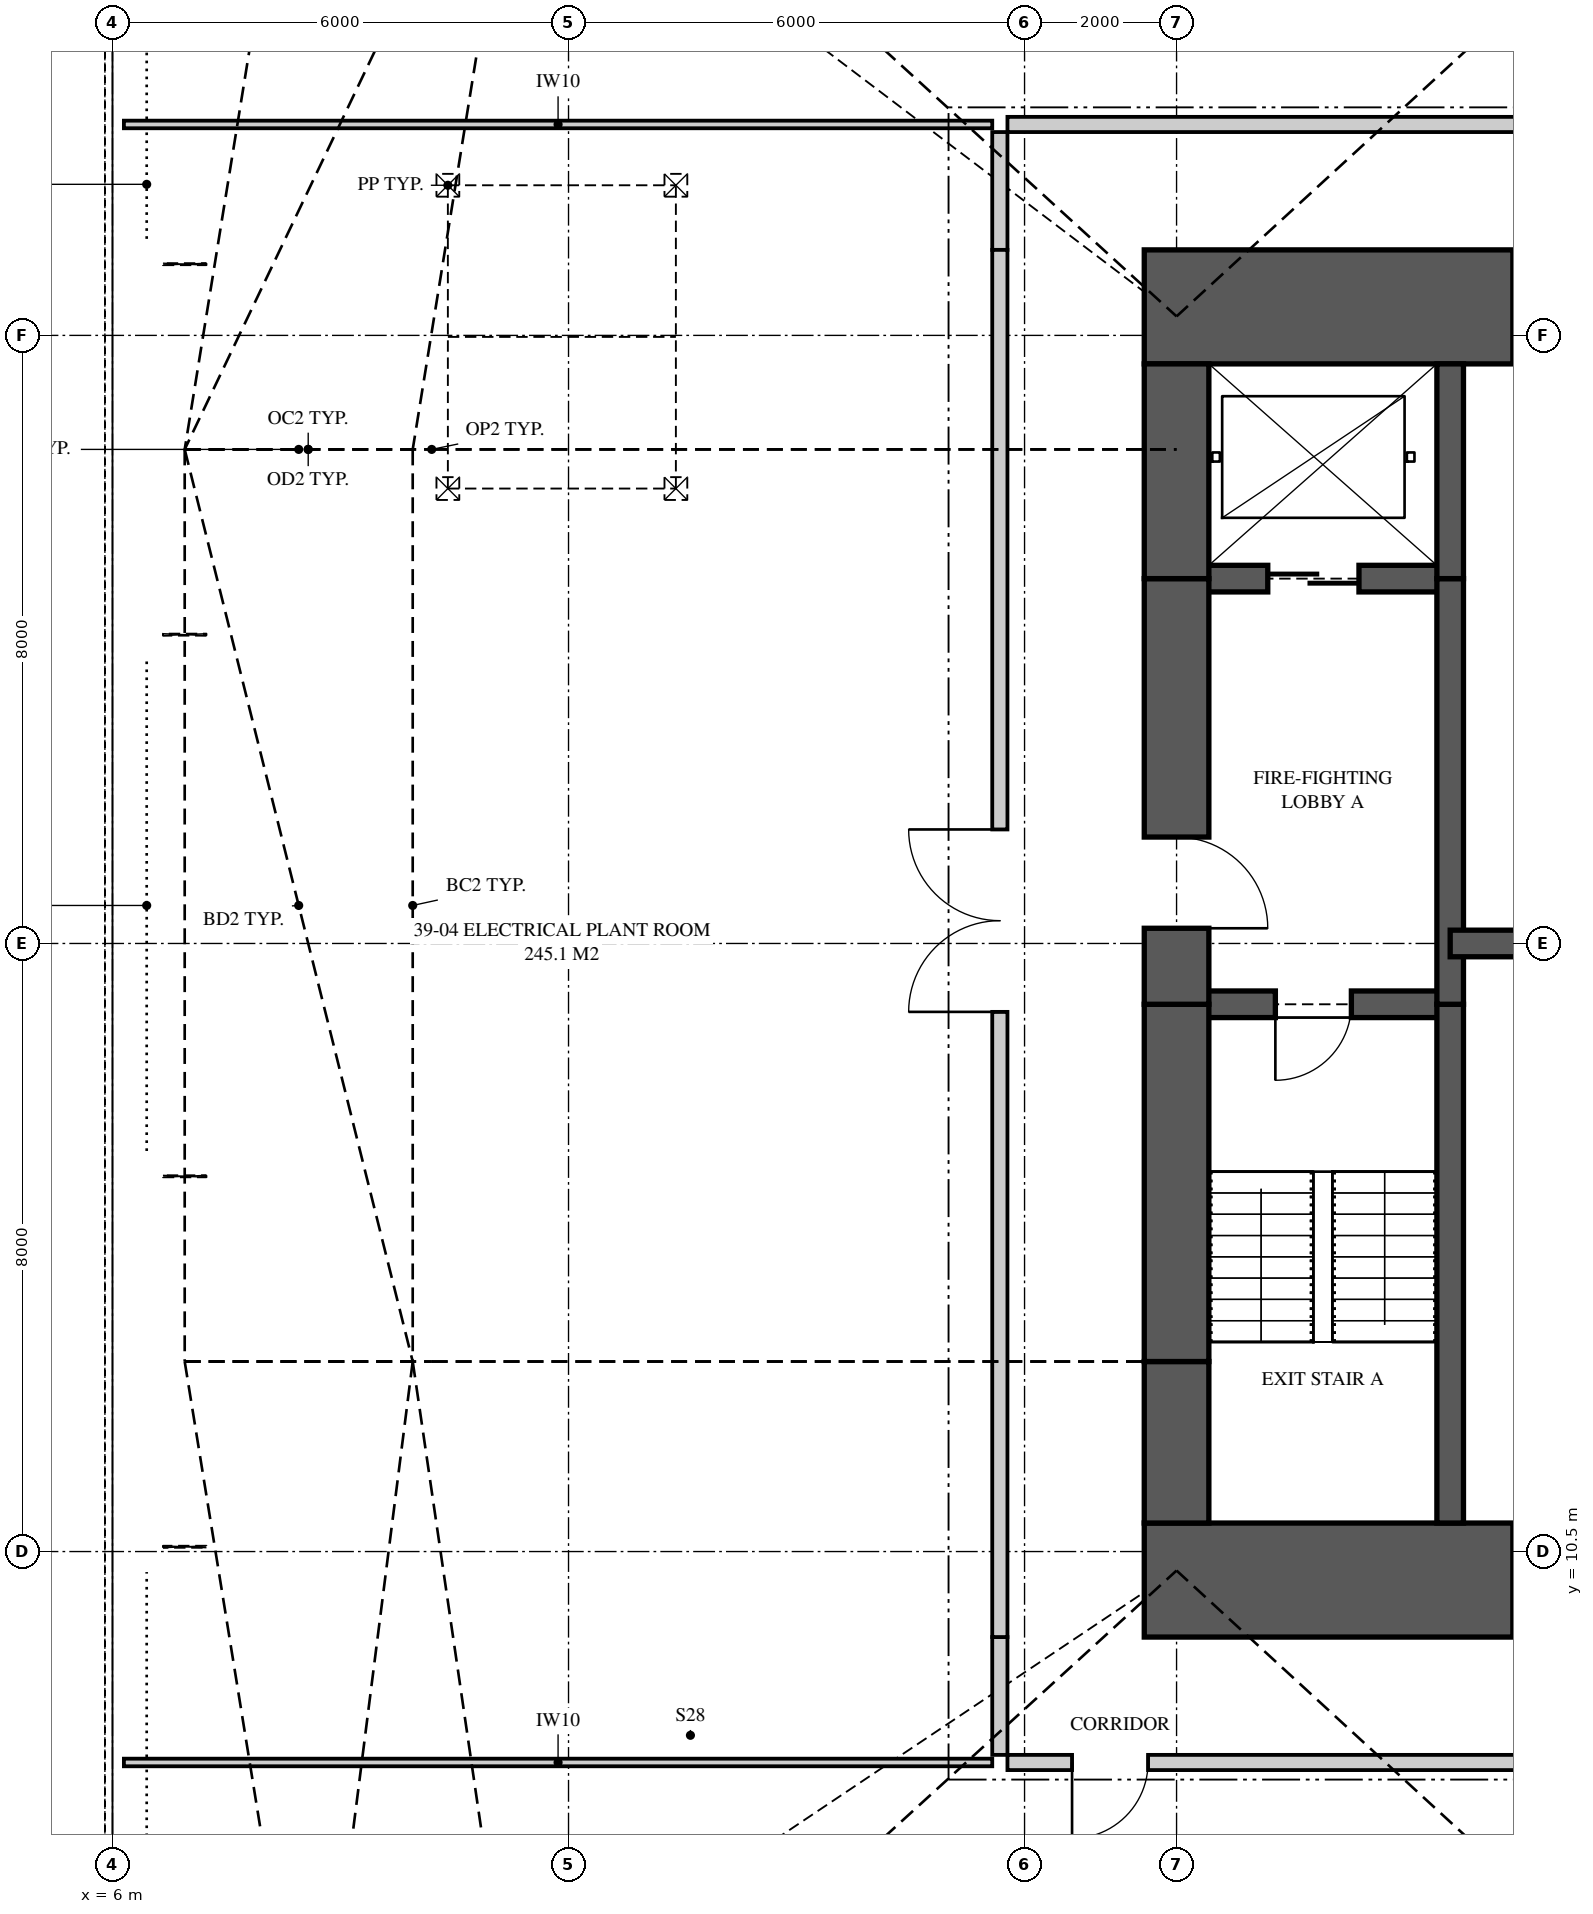
"""IFC4 building model, lengths in metres.
Left out: names, types, materials, properties, quantities, classifications, styles, units other than length and angle.
Written with IfcOpenShell. Run it as: python <this file> out.ifc"""

import sys

from ifc_helpers import new_model, si_unit, direction, frame, frame_2d, origin, place, context, subcontext, project, spatial, polyline, rectangle, outline, extrude, element, fill, save


model = new_model("IFC4")
c1 = context("Model", 3, precision=1e-05, world=origin(), true_north=direction((0.0, 1.0)))
c2 = subcontext(c1, "Body", "Model", "MODEL_VIEW")
j1 = project(units=[si_unit("LENGTHUNIT", "METRE"), si_unit("PLANEANGLEUNIT", "RADIAN")], contexts=[c1])
p1 = place(None, origin())
s1 = spatial("IfcSite", under=j1, at=p1, CompositionType="ELEMENT")
p2 = place(p1, origin())
s2 = spatial("IfcBuilding", under=s1, at=p2, CompositionType="ELEMENT")
p3 = place(p2, frame((0.0, 0.0, 144.35)))
s3 = spatial("IfcBuildingStorey", under=s2, at=p3, CompositionType="ELEMENT", Elevation=144.35)
p4 = place(p3, frame((19.575, 10.125, 0.0), z_axis=(0.0, 0.0, 1.0), x_axis=(1.0, 0.0, 0.0)))
e1 = element("IfcWall", 1, at=p4, inside=s3, PredefinedType="SHEAR", context=c2, shape_type="SweptSolid", body=[
    extrude(rectangle(XDim=6.425, YDim=1.5, at=frame_2d((3.212, 0.0))), origin(), (0.0, 0.0, 1.0), 5.0),
])
p5 = place(p4, frame((4.85, 0.0, 0.0)))
e2 = element("IfcOpeningElement", 2, at=p5, cuts=e1, PredefinedType="OPENING", context=c2, shape_type="SweptSolid", body=[
    extrude(rectangle(XDim=0.75, YDim=2.1, at=frame_2d((0.375, 1.05))), frame((0.0, 0.76, 0.0), z_axis=(0.0, -1.0, 0.0), x_axis=(1.0, 0.0, 0.0)), (0.0, 0.0, 1.0), 1.52),
])
p6 = place(p3, frame((26.0, 26.875, 0.0), z_axis=(0.0, 0.0, 1.0), x_axis=(-1.0, 0.0, 0.0)))
e3 = element("IfcWall", 3, at=p6, inside=s3, PredefinedType="SHEAR", context=c2, shape_type="SweptSolid", body=[
    extrude(rectangle(XDim=6.425, YDim=1.5, at=frame_2d((3.212, 0.0))), origin(), (0.0, 0.0, 1.0), 5.0),
])
p7 = place(p6, frame((0.825, 0.0, 0.0)))
e4 = element("IfcOpeningElement", 4, at=p7, cuts=e3, PredefinedType="OPENING", context=c2, shape_type="SweptSolid", body=[
    extrude(rectangle(XDim=0.75, YDim=2.1, at=frame_2d((0.375, 1.05))), frame((0.0, 0.76, 0.0), z_axis=(0.0, -1.0, 0.0), x_axis=(1.0, 0.0, 0.0)), (0.0, 0.0, 1.0), 1.52),
])
p8 = place(p3, frame((20.0, 26.125, 0.0), z_axis=(0.0, 0.0, 1.0), x_axis=(0.0, -1.0, 0.0)))
e5 = element("IfcWall", 5, at=p8, inside=s3, PredefinedType="SHEAR", context=c2, shape_type="SweptSolid", body=[
    extrude(rectangle(XDim=2.825, YDim=0.85, at=frame_2d((1.413, 0.0))), origin(), (0.0, 0.0, 1.0), 5.0),
])
p9 = place(p3, frame((20.0, 23.3, 0.0), z_axis=(0.0, 0.0, 1.0), x_axis=(0.0, -1.0, 0.0)))
e6 = element("IfcWall", 6, at=p9, inside=s3, PredefinedType="SHEAR", context=c2, shape_type="SweptSolid", body=[
    extrude(rectangle(XDim=5.6, YDim=0.85, at=frame_2d((2.8, 0.0))), origin(), (0.0, 0.0, 1.0), 5.0),
])
p10 = place(p9, frame((3.4, 0.0, 0.0)))
e7 = element("IfcOpeningElement", 7, at=p10, cuts=e6, PredefinedType="OPENING", context=c2, shape_type="SweptSolid", body=[
    extrude(rectangle(XDim=1.2, YDim=2.2, at=frame_2d((0.6, 1.1))), frame((0.0, 0.435, 0.0), z_axis=(0.0, -1.0, 0.0), x_axis=(1.0, 0.0, 0.0)), (0.0, 0.0, 1.0), 0.87),
])
p11 = place(p3, frame((20.0, 17.7, 0.0), z_axis=(0.0, 0.0, 1.0), x_axis=(0.0, -1.0, 0.0)))
e8 = element("IfcWall", 8, at=p11, inside=s3, PredefinedType="SHEAR", context=c2, shape_type="SweptSolid", body=[
    extrude(rectangle(XDim=4.7, YDim=0.85, at=frame_2d((2.35, 0.0))), origin(), (0.0, 0.0, 1.0), 5.0),
])
p12 = place(p3, frame((20.0, 13.0, 0.0), z_axis=(0.0, 0.0, 1.0), x_axis=(0.0, -1.0, 0.0)))
e9 = element("IfcWall", 9, at=p12, inside=s3, PredefinedType="SHEAR", context=c2, shape_type="SweptSolid", body=[
    extrude(rectangle(XDim=2.125, YDim=0.85, at=frame_2d((1.062, 0.0))), origin(), (0.0, 0.0, 1.0), 5.0),
])
p13 = place(p3, frame((23.6, 10.875, 0.0), z_axis=(0.0, 0.0, 1.0), x_axis=(0.0, 1.0, 0.0)))
e10 = element("IfcWall", 10, at=p13, inside=s3, PredefinedType="SHEAR", context=c2, shape_type="SweptSolid", body=[
    extrude(rectangle(XDim=6.825, YDim=0.35, at=frame_2d((3.413, 0.0))), origin(), (0.0, 0.0, 1.0), 5.0),
])
p14 = place(p3, frame((23.6, 17.7, 0.0), z_axis=(0.0, 0.0, 1.0), x_axis=(0.0, 1.0, 0.0)))
e11 = element("IfcWall", 11, at=p14, inside=s3, PredefinedType="SHEAR", context=c2, shape_type="SweptSolid", body=[
    extrude(rectangle(XDim=5.6, YDim=0.35, at=frame_2d((2.8, 0.0))), origin(), (0.0, 0.0, 1.0), 5.0),
])
p15 = place(p3, frame((23.6, 23.3, 0.0), z_axis=(0.0, 0.0, 1.0), x_axis=(0.0, 1.0, 0.0)))
e12 = element("IfcWall", 12, at=p15, inside=s3, PredefinedType="SHEAR", context=c2, shape_type="SweptSolid", body=[
    extrude(rectangle(XDim=2.825, YDim=0.35, at=frame_2d((1.413, 0.0))), origin(), (0.0, 0.0, 1.0), 5.0),
])
p16 = place(p3, frame((20.0, 17.7, 0.0), z_axis=(0.0, 0.0, 1.0), x_axis=(1.0, 0.0, 0.0)))
e13 = element("IfcWall", 13, at=p16, inside=s3, PredefinedType="SHEAR", context=c2, shape_type="SweptSolid", body=[
    extrude(rectangle(XDim=3.6, YDim=0.35, at=frame_2d((1.8, 0.0))), origin(), (0.0, 0.0, 1.0), 5.0),
])
p17 = place(p16, frame((1.3, 0.0, 0.0)))
e14 = element("IfcOpeningElement", 14, at=p17, cuts=e13, PredefinedType="OPENING", context=c2, shape_type="SweptSolid", body=[
    extrude(rectangle(XDim=1.0, YDim=2.1, at=frame_2d((0.5, 1.05))), frame((0.0, 0.185, 0.0), z_axis=(0.0, -1.0, 0.0), x_axis=(1.0, 0.0, 0.0)), (0.0, 0.0, 1.0), 0.37),
])
p18 = place(p3, frame((20.0, 23.3, 0.0), z_axis=(0.0, 0.0, 1.0), x_axis=(1.0, 0.0, 0.0)))
e15 = element("IfcWall", 15, at=p18, inside=s3, PredefinedType="SHEAR", context=c2, shape_type="SweptSolid", body=[
    extrude(rectangle(XDim=3.6, YDim=0.35, at=frame_2d((1.8, 0.0))), origin(), (0.0, 0.0, 1.0), 5.0),
])
p19 = place(p18, frame((1.2, 0.0, 0.0)))
e16 = element("IfcOpeningElement", 16, at=p19, cuts=e15, PredefinedType="OPENING", context=c2, shape_type="SweptSolid", body=[
    extrude(rectangle(XDim=1.2, YDim=2.1, at=frame_2d((0.6, 1.05))), frame((0.0, 0.185, 0.0), z_axis=(0.0, -1.0, 0.0), x_axis=(1.0, 0.0, 0.0)), (0.0, 0.0, 1.0), 0.37),
])
p20 = place(p3, frame((23.6, 18.5, 0.0), z_axis=(0.0, 0.0, 1.0), x_axis=(1.0, 0.0, 0.0)))
e17 = element("IfcWall", 17, at=p20, inside=s3, PredefinedType="SHEAR", context=c2, shape_type="SweptSolid", body=[
    extrude(rectangle(XDim=2.4, YDim=0.35, at=frame_2d((1.2, 0.0))), origin(), (0.0, 0.0, 1.0), 5.0),
])
p21 = place(p3, frame((17.775, 7.725, 0.0), z_axis=(0.0, 0.0, 1.0), x_axis=(1.0, 0.0, 0.0)))
e18 = element("IfcWall", 18, at=p21, inside=s3, PredefinedType="PARTITIONING", context=c2, shape_type="SweptSolid", body=[
    extrude(outline(polyline([(28.25, 0.0), (28.25, 4.72), (27.983, 4.72), (27.983, 4.141), (27.295, 4.141), (27.295, 4.72), (25.672, 4.72), (25.672, 4.141), (24.748, 4.141), (24.748, 4.72), (20.146, 4.72), (20.146, 4.141), (19.233, 4.141), (19.233, 4.72), (16.72, 4.72), (16.72, 4.141), (15.864, 4.141), (15.864, 4.72), (12.635, 4.72), (12.635, 4.208), (12.065, 4.208), (12.065, 4.72), (8.798, 4.72), (8.798, 4.141), (7.945, 4.141), (7.945, 4.72), (5.432, 4.72), (5.432, 4.141), (4.516, 4.141), (4.516, 4.72), (0.0, 4.72), (0.0, 0.0), (26.463, 0.0), (26.463, 2.2), (27.621, 2.2), (27.621, 0.0), (28.25, 0.0)]), holes=[polyline([(11.405, 3.239), (11.459, 3.353), (12.006, 3.423), (12.006, 2.917), (11.951, 2.803), (11.405, 2.732), (11.405, 3.239)])]), frame((0.0, 0.1, 0.0), z_axis=(0.0, -1.0, 0.0), x_axis=(1.0, 0.0, 0.0)), (0.0, 0.0, 1.0), 0.2),
])
p22 = place(p21, frame((0.85, 0.0, 0.0)))
e19 = element("IfcOpeningElement", 19, at=p22, cuts=e18, PredefinedType="OPENING", context=c2, shape_type="SweptSolid", body=[
    extrude(rectangle(XDim=1.0, YDim=2.1, at=frame_2d((0.5, 1.05))), frame((0.0, 0.11, 0.0), z_axis=(0.0, -1.0, 0.0), x_axis=(1.0, 0.0, 0.0)), (0.0, 0.0, 1.0), 0.22),
])
p23 = place(p21, frame((25.25, 0.0, 0.0)))
e20 = element("IfcOpeningElement", 20, at=p23, cuts=e18, PredefinedType="OPENING", context=c2, shape_type="SweptSolid", body=[
    extrude(rectangle(XDim=1.0, YDim=2.1, at=frame_2d((0.5, 1.05))), frame((0.0, 0.11, 0.0), z_axis=(0.0, -1.0, 0.0), x_axis=(1.0, 0.0, 0.0)), (0.0, 0.0, 1.0), 0.22),
])
p24 = place(p3, frame((17.675, 7.825, 0.0), z_axis=(0.0, 0.0, 1.0), x_axis=(0.0, 1.0, 0.0)))
e21 = element("IfcWall", 21, at=p24, inside=s3, PredefinedType="PARTITIONING", context=c2, shape_type="SweptSolid", body=[
    extrude(outline(polyline([(1.55, 2.2), (1.55, 4.72), (0.716, 4.72), (0.716, 4.141), (0.0, 4.141), (0.0, 0.0), (0.198, 0.0), (0.198, 2.2), (1.55, 2.2)])), frame((0.0, 0.1, 0.0), z_axis=(0.0, -1.0, 0.0), x_axis=(1.0, 0.0, 0.0)), (0.0, 0.0, 1.0), 0.2),
])
p25 = place(p3, frame((17.775, 29.275, 0.0), z_axis=(0.0, 0.0, 1.0), x_axis=(1.0, 0.0, 0.0)))
e22 = element("IfcWall", 22, at=p25, inside=s3, PredefinedType="PARTITIONING", context=c2, shape_type="SweptSolid", body=[
    extrude(outline(polyline([(28.25, 0.0), (28.25, 4.72), (27.983, 4.72), (27.983, 4.141), (27.295, 4.141), (27.295, 4.72), (25.672, 4.72), (25.672, 4.141), (24.748, 4.141), (24.748, 4.72), (20.146, 4.72), (20.146, 4.141), (19.233, 4.141), (19.233, 4.72), (16.72, 4.72), (16.72, 4.141), (15.864, 4.141), (15.864, 4.72), (12.635, 4.72), (12.635, 4.208), (12.065, 4.208), (12.065, 4.72), (8.798, 4.72), (8.798, 4.141), (7.945, 4.141), (7.945, 4.72), (5.432, 4.72), (5.432, 4.141), (4.516, 4.141), (4.516, 4.72), (0.0, 4.72), (0.0, 0.0), (26.358, 0.0), (26.358, 2.2), (27.49, 2.2), (27.49, 0.0), (28.25, 0.0)]), holes=[polyline([(11.471, 3.377), (11.521, 3.481), (12.064, 3.539), (12.064, 3.042), (12.015, 2.938), (11.471, 2.88), (11.471, 3.377)])]), frame((0.0, 0.1, 0.0), z_axis=(0.0, -1.0, 0.0), x_axis=(1.0, 0.0, 0.0)), (0.0, 0.0, 1.0), 0.2),
])
p26 = place(p25, frame((13.225, 0.0, 0.0)))
e23 = element("IfcOpeningElement", 23, at=p26, cuts=e22, PredefinedType="OPENING", context=c2, shape_type="SweptSolid", body=[
    extrude(rectangle(XDim=2.4, YDim=2.4, at=frame_2d((1.2, 1.2))), frame((0.0, 0.11, 0.0), z_axis=(0.0, -1.0, 0.0), x_axis=(1.0, 0.0, 0.0)), (0.0, 0.0, 1.0), 0.22),
])
p27 = place(p3, frame((17.675, 27.625, 0.0), z_axis=(0.0, 0.0, 1.0), x_axis=(0.0, 1.0, 0.0)))
e24 = element("IfcWall", 24, at=p27, inside=s3, PredefinedType="PARTITIONING", context=c2, shape_type="SweptSolid", body=[
    extrude(outline(polyline([(0.184, 2.2), (1.55, 2.2), (1.55, 4.141), (0.834, 4.141), (0.834, 4.72), (0.0, 4.72), (0.0, 0.0), (0.184, 0.0), (0.184, 2.2)])), frame((0.0, 0.1, 0.0), z_axis=(0.0, -1.0, 0.0), x_axis=(1.0, 0.0, 0.0)), (0.0, 0.0, 1.0), 0.2),
])
p28 = place(p3, frame((17.675, 9.375, 0.0), z_axis=(0.0, 0.0, 1.0), x_axis=(0.0, 1.0, 0.0)))
e25 = element("IfcWall", 25, at=p28, inside=s3, PredefinedType="PARTITIONING", context=c2, shape_type="SweptSolid", body=[
    extrude(outline(polyline([(18.25, 0.0), (18.25, 4.72), (15.975, 4.72), (15.975, 4.02), (15.275, 4.02), (15.275, 4.72), (3.975, 4.72), (3.975, 4.02), (3.275, 4.02), (3.275, 4.72), (0.0, 4.72), (0.0, 0.0), (18.25, 0.0)]), holes=[polyline([(3.396, 2.835), (3.396, 3.533), (3.854, 3.533), (3.854, 2.835), (3.396, 2.835)]), polyline([(15.396, 2.835), (15.396, 3.533), (15.854, 3.533), (15.854, 2.835), (15.396, 2.835)])]), frame((0.0, 0.1, 0.0), z_axis=(0.0, -1.0, 0.0), x_axis=(1.0, 0.0, 0.0)), (0.0, 0.0, 1.0), 0.2),
])
p29 = place(p28, frame((8.225, 0.0, 0.0)))
e26 = element("IfcOpeningElement", 26, at=p29, cuts=e25, PredefinedType="OPENING", context=c2, shape_type="SweptSolid", body=[
    extrude(rectangle(XDim=2.4, YDim=2.4, at=frame_2d((1.2, 1.2))), frame((0.0, 0.11, 0.0), z_axis=(0.0, -1.0, 0.0), x_axis=(1.0, 0.0, 0.0)), (0.0, 0.0, 1.0), 0.22),
])
p30 = place(p3, frame((6.15, 7.725, 0.0), z_axis=(0.0, 0.0, 1.0), x_axis=(1.0, 0.0, 0.0)))
e27 = element("IfcWall", 27, at=p30, inside=s3, PredefinedType="PARTITIONING", context=c2, shape_type="SweptSolid", body=[
    extrude(outline(polyline([(11.055, 0.0), (11.425, 0.0), (11.425, 4.141), (10.676, 4.141), (10.676, 4.72), (5.288, 4.72), (5.288, 3.32), (3.858, 3.32), (3.858, 4.72), (0.0, 4.72), (0.0, 0.0), (9.109, 0.0), (9.109, 2.2), (11.055, 2.2), (11.055, 0.0)]), holes=[polyline([(2.508, 0.74), (2.508, 2.082), (2.523, 2.138), (3.75, 2.212), (3.75, 0.87), (3.736, 0.814), (2.508, 0.74)])]), frame((0.0, 0.05, 0.0), z_axis=(0.0, -1.0, 0.0), x_axis=(1.0, 0.0, 0.0)), (0.0, 0.0, 1.0), 0.1),
])
p31 = place(p3, frame((6.15, 29.275, 0.0), z_axis=(0.0, 0.0, 1.0), x_axis=(1.0, 0.0, 0.0)))
e28 = element("IfcWall", 28, at=p31, inside=s3, PredefinedType="PARTITIONING", context=c2, shape_type="SweptSolid", body=[
    extrude(outline(polyline([(9.626, 2.2), (11.425, 2.2), (11.425, 4.141), (10.676, 4.141), (10.676, 4.72), (5.209, 4.72), (5.209, 3.32), (3.775, 3.32), (3.775, 4.72), (0.0, 4.72), (0.0, 0.0), (9.626, 0.0), (9.626, 2.2)]), holes=[polyline([(2.142, 0.429), (2.142, 1.773), (2.195, 1.831), (3.54, 2.106), (3.54, 0.762), (3.487, 0.704), (2.142, 0.429)])]), frame((0.0, 0.05, 0.0), z_axis=(0.0, -1.0, 0.0), x_axis=(1.0, 0.0, 0.0)), (0.0, 0.0, 1.0), 0.1),
])
p32 = place(p22, frame((1.0, 0.0, 0.0), z_axis=(0.0, 0.0, 1.0), x_axis=(-1.0, 0.0, 0.0)))
e29 = element("IfcDoor", 29, at=p32, inside=s3, OperationType="SINGLE_SWING_RIGHT", PredefinedType="DOOR", context=c2, shape_type="SweptSolid", body=[
    extrude(rectangle(XDim=1.0, YDim=2.1, at=frame_2d((0.5, 1.05))), frame((0.0, 0.025, 0.0), z_axis=(0.0, -1.0, 0.0), x_axis=(1.0, 0.0, 0.0)), (0.0, 0.0, 1.0), 0.05),
])
fill(e19, e29)
p33 = place(p29, origin())
e30 = element("IfcDoor", 30, at=p33, inside=s3, OperationType="DOUBLE_DOOR_SINGLE_SWING", PredefinedType="DOOR", context=c2, shape_type="SweptSolid", body=[
    extrude(rectangle(XDim=2.4, YDim=2.4, at=frame_2d((1.2, 1.2))), frame((0.0, 0.025, 0.0), z_axis=(0.0, -1.0, 0.0), x_axis=(1.0, 0.0, 0.0)), (0.0, 0.0, 1.0), 0.05),
])
fill(e26, e30)
p34 = place(p17, frame((1.0, 0.0, 0.0), z_axis=(0.0, 0.0, 1.0), x_axis=(-1.0, 0.0, 0.0)))
e31 = element("IfcDoor", 31, at=p34, inside=s3, OperationType="SINGLE_SWING_RIGHT", PredefinedType="DOOR", context=c2, shape_type="SweptSolid", body=[
    extrude(rectangle(XDim=1.0, YDim=2.1, at=frame_2d((0.5, 1.05))), frame((0.0, 0.025, 0.0), z_axis=(0.0, -1.0, 0.0), x_axis=(1.0, 0.0, 0.0)), (0.0, 0.0, 1.0), 0.05),
])
fill(e14, e31)
p35 = place(p10, origin())
e32 = element("IfcDoor", 32, at=p35, inside=s3, OperationType="SINGLE_SWING_RIGHT", PredefinedType="DOOR", context=c2, shape_type="SweptSolid", body=[
    extrude(rectangle(XDim=1.2, YDim=2.2, at=frame_2d((0.6, 1.1))), frame((0.0, 0.025, 0.0), z_axis=(0.0, -1.0, 0.0), x_axis=(1.0, 0.0, 0.0)), (0.0, 0.0, 1.0), 0.05),
])
fill(e7, e32)
p36 = place(p19, origin())
e33 = element("IfcDoor", 33, at=p36, inside=s3, OperationType="SLIDING_TO_LEFT", PredefinedType="DOOR", context=c2, shape_type="SweptSolid", body=[
    extrude(rectangle(XDim=1.2, YDim=2.1, at=frame_2d((0.6, 1.05))), frame((0.0, 0.025, 0.0), z_axis=(0.0, -1.0, 0.0), x_axis=(1.0, 0.0, 0.0)), (0.0, 0.0, 1.0), 0.05),
])
fill(e16, e33)
save(model, sys.argv[1])
